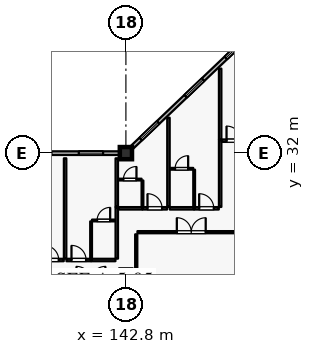
"""IFC4 building model, lengths in metres.
Left out: names, types, materials, properties, quantities, classifications, styles, units other than length and angle.
Written with IfcOpenShell. Run it as: python <this file> out.ifc"""

import sys

from ifc_helpers import new_model, si_unit, direction, frame, frame_2d, origin, origin_2d, place, context, subcontext, project, spatial, rectangle, extrude, element, fill, save


model = new_model("IFC4")
c1 = context("Model", 3, precision=1e-05, world=origin(), true_north=direction((0.0, 1.0)))
c2 = subcontext(c1, "Body", "Model", "MODEL_VIEW")
j1 = project(units=[si_unit("LENGTHUNIT", "METRE"), si_unit("PLANEANGLEUNIT", "RADIAN")], contexts=[c1])
p1 = place(None, origin())
s1 = spatial("IfcSite", under=j1, at=p1, CompositionType="ELEMENT")
p2 = place(p1, origin())
s2 = spatial("IfcBuilding", under=s1, at=p2, CompositionType="ELEMENT")
p3 = place(p2, frame((0.0, 0.0, 25.2)))
s3 = spatial("IfcBuildingStorey", under=s2, at=p3, CompositionType="ELEMENT", Elevation=25.2)
p4 = place(p3, frame((142.8, 32.0, 0.0), z_axis=(0.0, 0.0, 1.0), x_axis=(1.0, 0.0, 0.0)))
e1 = element("IfcColumn", 1, at=p4, inside=s3, PredefinedType="COLUMN", context=c2, shape_type="SweptSolid", body=[
    extrude(rectangle(XDim=0.8, YDim=0.8, at=origin_2d()), origin(), (0.0, 0.0, 1.0), 3.6),
])
p5 = place(p3, frame((142.8, 24.0, 0.0), z_axis=(0.0, 0.0, 1.0), x_axis=(1.0, 0.0, 0.0)))
e2 = element("IfcColumn", 2, at=p5, inside=s3, PredefinedType="COLUMN", context=c2, shape_type="SweptSolid", body=[
    extrude(rectangle(XDim=0.7, YDim=0.7, at=origin_2d()), origin(), (0.0, 0.0, 1.0), 3.6),
])
p6 = place(p3, frame((134.8, 32.0, 0.0), z_axis=(0.0, 0.0, 1.0), x_axis=(1.0, 0.0, 0.0)))
e3 = element("IfcWall", 3, at=p6, inside=s3, PredefinedType="SOLIDWALL", context=c2, shape_type="SweptSolid", body=[
    extrude(rectangle(XDim=7.6, YDim=0.24, at=frame_2d((3.8, 0.0))), origin(), (0.0, 0.0, 1.0), 2.93),
])
p7 = place(p6, frame((1.5, 0.0, 0.8)))
e4 = element("IfcOpeningElement", 4, at=p7, cuts=e3, PredefinedType="OPENING", context=c2, shape_type="SweptSolid", body=[
    extrude(rectangle(XDim=1.6, YDim=1.6, at=frame_2d((0.8, 0.8))), frame((0.0, 0.13, 0.0), z_axis=(0.0, -1.0, 0.0), x_axis=(1.0, 0.0, 0.0)), (0.0, 0.0, 1.0), 0.26),
])
p8 = place(p6, frame((4.9, 0.0, 0.8)))
e5 = element("IfcOpeningElement", 5, at=p8, cuts=e3, PredefinedType="OPENING", context=c2, shape_type="SweptSolid", body=[
    extrude(rectangle(XDim=1.6, YDim=1.6, at=frame_2d((0.8, 0.8))), frame((0.0, 0.13, 0.0), z_axis=(0.0, -1.0, 0.0), x_axis=(1.0, 0.0, 0.0)), (0.0, 0.0, 1.0), 0.26),
])
p9 = place(p3, frame((143.2, 32.381, 0.0), z_axis=(0.0, 0.0, 1.0), x_axis=(0.724156739794, 0.689635422677, 0.0)))
e6 = element("IfcWall", 6, at=p9, inside=s3, PredefinedType="SOLIDWALL", context=c2, shape_type="SweptSolid", body=[
    extrude(rectangle(XDim=10.495, YDim=0.24, at=frame_2d((5.248, 0.0))), origin(), (0.0, 0.0, 1.0), 2.93),
])
p10 = place(p9, frame((0.788, 0.0, 0.8)))
e7 = element("IfcOpeningElement", 7, at=p10, cuts=e6, PredefinedType="OPENING", context=c2, shape_type="SweptSolid", body=[
    extrude(rectangle(XDim=1.6, YDim=1.6, at=frame_2d((0.8, 0.8))), frame((0.0, 0.13, 0.0), z_axis=(0.0, -1.0, 0.0), x_axis=(1.0, 0.0, 0.0)), (0.0, 0.0, 1.0), 0.26),
])
p11 = place(p9, frame((4.862, 0.0, 0.8)))
e8 = element("IfcOpeningElement", 8, at=p11, cuts=e6, PredefinedType="OPENING", context=c2, shape_type="SweptSolid", body=[
    extrude(rectangle(XDim=1.6, YDim=1.6, at=frame_2d((0.8, 0.8))), frame((0.0, 0.13, 0.0), z_axis=(0.0, -1.0, 0.0), x_axis=(1.0, 0.0, 0.0)), (0.0, 0.0, 1.0), 0.26),
])
p12 = place(p9, frame((8.521, 0.0, 0.8)))
e9 = element("IfcOpeningElement", 9, at=p12, cuts=e6, PredefinedType="OPENING", context=c2, shape_type="SweptSolid", body=[
    extrude(rectangle(XDim=1.6, YDim=1.6, at=frame_2d((0.8, 0.8))), frame((0.0, 0.13, 0.0), z_axis=(0.0, -1.0, 0.0), x_axis=(1.0, 0.0, 0.0)), (0.0, 0.0, 1.0), 0.26),
])
p13 = place(p3, frame((137.09, 24.97, 0.0), z_axis=(0.0, 0.0, 1.0), x_axis=(1.0, 0.0, 0.0)))
e10 = element("IfcWall", 10, at=p13, inside=s3, PredefinedType="PARTITIONING", context=c2, shape_type="SweptSolid", body=[
    extrude(rectangle(XDim=1.62, YDim=0.16, at=frame_2d((0.81, 0.0))), origin(), (0.0, 0.0, 1.0), 3.335),
])
p14 = place(p13, frame((0.33, 0.0, 0.0)))
e11 = element("IfcOpeningElement", 11, at=p14, cuts=e10, PredefinedType="OPENING", context=c2, shape_type="SweptSolid", body=[
    extrude(rectangle(XDim=0.96, YDim=2.2, at=frame_2d((0.48, 1.1))), frame((0.0, 0.09, 0.0), z_axis=(0.0, -1.0, 0.0), x_axis=(1.0, 0.0, 0.0)), (0.0, 0.0, 1.0), 0.18),
])
p15 = place(p3, frame((138.89, 24.97, 0.0), z_axis=(0.0, 0.0, 1.0), x_axis=(1.0, 0.0, 0.0)))
e12 = element("IfcWall", 12, at=p15, inside=s3, PredefinedType="PARTITIONING", context=c2, shape_type="SweptSolid", body=[
    extrude(rectangle(XDim=1.62, YDim=0.16, at=frame_2d((0.81, 0.0))), origin(), (0.0, 0.0, 1.0), 3.335),
])
p16 = place(p15, frame((0.33, 0.0, 0.0)))
e13 = element("IfcOpeningElement", 13, at=p16, cuts=e12, PredefinedType="OPENING", context=c2, shape_type="SweptSolid", body=[
    extrude(rectangle(XDim=0.96, YDim=2.2, at=frame_2d((0.48, 1.1))), frame((0.0, 0.09, 0.0), z_axis=(0.0, -1.0, 0.0), x_axis=(1.0, 0.0, 0.0)), (0.0, 0.0, 1.0), 0.18),
])
p17 = place(p3, frame((140.52, 24.97, 0.0), z_axis=(0.0, 0.0, 1.0), x_axis=(1.0, 0.0, 0.0)))
e14 = element("IfcWall", 14, at=p17, inside=s3, PredefinedType="PARTITIONING", context=c2, shape_type="SweptSolid", body=[
    extrude(rectangle(XDim=1.59, YDim=0.16, at=frame_2d((0.795, 0.0))), origin(), (0.0, 0.0, 1.0), 3.335),
])
p18 = place(p3, frame((140.51, 25.06, 0.0), z_axis=(0.0, 0.0, 1.0), x_axis=(0.0, 1.0, 0.0)))
e15 = element("IfcWall", 15, at=p18, inside=s3, PredefinedType="PARTITIONING", context=c2, shape_type="SweptSolid", body=[
    extrude(rectangle(XDim=2.45, YDim=0.115, at=frame_2d((1.225, 0.0))), origin(), (0.0, 0.0, 1.0), 3.335),
])
p19 = place(p3, frame((140.57, 27.57, 0.0), z_axis=(0.0, 0.0, 1.0), x_axis=(1.0, 0.0, 0.0)))
e16 = element("IfcWall", 16, at=p19, inside=s3, PredefinedType="PARTITIONING", context=c2, shape_type="SweptSolid", body=[
    extrude(rectangle(XDim=1.53, YDim=0.115, at=frame_2d((0.765, 0.0))), origin(), (0.0, 0.0, 1.0), 3.335),
])
p20 = place(p19, frame((0.335, 0.0, 0.0)))
e17 = element("IfcOpeningElement", 17, at=p20, cuts=e16, PredefinedType="OPENING", context=c2, shape_type="SweptSolid", body=[
    extrude(rectangle(XDim=0.86, YDim=2.12, at=frame_2d((0.43, 1.06))), frame((0.0, 0.067, 0.0), z_axis=(0.0, -1.0, 0.0), x_axis=(1.0, 0.0, 0.0)), (0.0, 0.0, 1.0), 0.135),
])
p21 = place(p3, frame((138.8, 25.06, 0.0), z_axis=(0.0, 0.0, 1.0), x_axis=(0.0, 1.0, 0.0)))
e18 = element("IfcWall", 18, at=p21, inside=s3, PredefinedType="PARTITIONING", context=c2, shape_type="SweptSolid", body=[
    extrude(rectangle(XDim=6.6, YDim=0.16, at=frame_2d((3.3, 0.0))), origin(), (0.0, 0.0, 1.0), 3.335),
])
p22 = place(p3, frame((142.2, 25.06, 0.0), z_axis=(0.0, 0.0, 1.0), x_axis=(0.0, 1.0, 0.0)))
e19 = element("IfcWall", 19, at=p22, inside=s3, PredefinedType="PARTITIONING", context=c2, shape_type="SweptSolid", body=[
    extrude(rectangle(XDim=3.39, YDim=0.16, at=frame_2d((1.695, 0.0))), origin(), (0.0, 0.0, 1.0), 3.335),
])
p23 = place(p3, frame((142.29, 28.37, 0.0), z_axis=(0.0, 0.0, 1.0), x_axis=(1.0, 0.0, 0.0)))
e20 = element("IfcWall", 20, at=p23, inside=s3, PredefinedType="PARTITIONING", context=c2, shape_type="SweptSolid", body=[
    extrude(rectangle(XDim=1.59, YDim=0.16, at=frame_2d((0.795, 0.0))), origin(), (0.0, 0.0, 1.0), 3.335),
])
p24 = place(p3, frame((143.89, 28.37, 0.0), z_axis=(0.0, 0.0, 1.0), x_axis=(1.0, 0.0, 0.0)))
e21 = element("IfcWall", 21, at=p24, inside=s3, PredefinedType="PARTITIONING", context=c2, shape_type="SweptSolid", body=[
    extrude(rectangle(XDim=1.62, YDim=0.16, at=frame_2d((0.81, 0.0))), origin(), (0.0, 0.0, 1.0), 3.335),
])
p25 = place(p24, frame((0.33, 0.0, 0.0)))
e22 = element("IfcOpeningElement", 22, at=p25, cuts=e21, PredefinedType="OPENING", context=c2, shape_type="SweptSolid", body=[
    extrude(rectangle(XDim=0.96, YDim=2.2, at=frame_2d((0.48, 1.1))), frame((0.0, 0.09, 0.0), z_axis=(0.0, -1.0, 0.0), x_axis=(1.0, 0.0, 0.0)), (0.0, 0.0, 1.0), 0.18),
])
p26 = place(p3, frame((143.89, 28.46, 0.0), z_axis=(0.0, 0.0, 1.0), x_axis=(0.0, 1.0, 0.0)))
e23 = element("IfcWall", 23, at=p26, inside=s3, PredefinedType="PARTITIONING", context=c2, shape_type="SweptSolid", body=[
    extrude(rectangle(XDim=1.74, YDim=0.115, at=frame_2d((0.87, 0.0))), origin(), (0.0, 0.0, 1.0), 3.335),
])
p27 = place(p3, frame((142.3, 30.26, 0.0), z_axis=(0.0, 0.0, 1.0), x_axis=(1.0, 0.0, 0.0)))
e24 = element("IfcWall", 24, at=p27, inside=s3, PredefinedType="PARTITIONING", context=c2, shape_type="SweptSolid", body=[
    extrude(rectangle(XDim=1.53, YDim=0.115, at=frame_2d((0.765, 0.0))), origin(), (0.0, 0.0, 1.0), 3.335),
])
p28 = place(p27, frame((0.335, 0.0, 0.0)))
e25 = element("IfcOpeningElement", 25, at=p28, cuts=e24, PredefinedType="OPENING", context=c2, shape_type="SweptSolid", body=[
    extrude(rectangle(XDim=0.86, YDim=2.12, at=frame_2d((0.43, 1.06))), frame((0.0, 0.067, 0.0), z_axis=(0.0, -1.0, 0.0), x_axis=(1.0, 0.0, 0.0)), (0.0, 0.0, 1.0), 0.135),
])
p29 = place(p3, frame((142.2, 28.46, 0.0), z_axis=(0.0, 0.0, 1.0), x_axis=(0.0, 1.0, 0.0)))
e26 = element("IfcWall", 26, at=p29, inside=s3, PredefinedType="PARTITIONING", context=c2, shape_type="SweptSolid", body=[
    extrude(rectangle(XDim=3.2, YDim=0.16, at=frame_2d((1.6, 0.0))), origin(), (0.0, 0.0, 1.0), 3.335),
])
p30 = place(p3, frame((145.69, 28.37, 0.0), z_axis=(0.0, 0.0, 1.0), x_axis=(1.0, 0.0, 0.0)))
e27 = element("IfcWall", 27, at=p30, inside=s3, PredefinedType="PARTITIONING", context=c2, shape_type="SweptSolid", body=[
    extrude(rectangle(XDim=1.59, YDim=0.16, at=frame_2d((0.795, 0.0))), origin(), (0.0, 0.0, 1.0), 3.335),
])
p31 = place(p3, frame((147.29, 28.37, 0.0), z_axis=(0.0, 0.0, 1.0), x_axis=(1.0, 0.0, 0.0)))
e28 = element("IfcWall", 28, at=p31, inside=s3, PredefinedType="PARTITIONING", context=c2, shape_type="SweptSolid", body=[
    extrude(rectangle(XDim=1.62, YDim=0.16, at=frame_2d((0.81, 0.0))), origin(), (0.0, 0.0, 1.0), 3.335),
])
p32 = place(p31, frame((0.33, 0.0, 0.0)))
e29 = element("IfcOpeningElement", 29, at=p32, cuts=e28, PredefinedType="OPENING", context=c2, shape_type="SweptSolid", body=[
    extrude(rectangle(XDim=0.96, YDim=2.2, at=frame_2d((0.48, 1.1))), frame((0.0, 0.09, 0.0), z_axis=(0.0, -1.0, 0.0), x_axis=(1.0, 0.0, 0.0)), (0.0, 0.0, 1.0), 0.18),
])
p33 = place(p3, frame((147.29, 28.46, 0.0), z_axis=(0.0, 0.0, 1.0), x_axis=(0.0, 1.0, 0.0)))
e30 = element("IfcWall", 30, at=p33, inside=s3, PredefinedType="PARTITIONING", context=c2, shape_type="SweptSolid", body=[
    extrude(rectangle(XDim=2.45, YDim=0.115, at=frame_2d((1.225, 0.0))), origin(), (0.0, 0.0, 1.0), 3.335),
])
p34 = place(p3, frame((145.7, 30.97, 0.0), z_axis=(0.0, 0.0, 1.0), x_axis=(1.0, 0.0, 0.0)))
e31 = element("IfcWall", 31, at=p34, inside=s3, PredefinedType="PARTITIONING", context=c2, shape_type="SweptSolid", body=[
    extrude(rectangle(XDim=1.53, YDim=0.115, at=frame_2d((0.765, 0.0))), origin(), (0.0, 0.0, 1.0), 3.335),
])
p35 = place(p34, frame((0.335, 0.0, 0.0)))
e32 = element("IfcOpeningElement", 32, at=p35, cuts=e31, PredefinedType="OPENING", context=c2, shape_type="SweptSolid", body=[
    extrude(rectangle(XDim=0.86, YDim=2.12, at=frame_2d((0.43, 1.06))), frame((0.0, 0.067, 0.0), z_axis=(0.0, -1.0, 0.0), x_axis=(1.0, 0.0, 0.0)), (0.0, 0.0, 1.0), 0.135),
])
p36 = place(p3, frame((145.6, 28.46, 0.0), z_axis=(0.0, 0.0, 1.0), x_axis=(0.0, 1.0, 0.0)))
e33 = element("IfcWall", 33, at=p36, inside=s3, PredefinedType="PARTITIONING", context=c2, shape_type="SweptSolid", body=[
    extrude(rectangle(XDim=5.87, YDim=0.16, at=frame_2d((2.935, 0.0))), origin(), (0.0, 0.0, 1.0), 3.335),
])
p37 = place(p3, frame((149.0, 28.46, 0.0), z_axis=(0.0, 0.0, 1.0), x_axis=(0.0, 1.0, 0.0)))
e34 = element("IfcWall", 34, at=p37, inside=s3, PredefinedType="PARTITIONING", context=c2, shape_type="SweptSolid", body=[
    extrude(rectangle(XDim=4.44, YDim=0.16, at=frame_2d((2.22, 0.0))), origin(), (0.0, 0.0, 1.0), 3.335),
])
p38 = place(p3, frame((149.09, 32.82, 0.0), z_axis=(0.0, 0.0, 1.0), x_axis=(1.0, 0.0, 0.0)))
e35 = element("IfcWall", 35, at=p38, inside=s3, PredefinedType="PARTITIONING", context=c2, shape_type="SweptSolid", body=[
    extrude(rectangle(XDim=1.62, YDim=0.16, at=frame_2d((0.81, 0.0))), origin(), (0.0, 0.0, 1.0), 3.335),
])
p39 = place(p38, frame((0.33, 0.0, 0.0)))
e36 = element("IfcOpeningElement", 36, at=p39, cuts=e35, PredefinedType="OPENING", context=c2, shape_type="SweptSolid", body=[
    extrude(rectangle(XDim=0.96, YDim=2.2, at=frame_2d((0.48, 1.1))), frame((0.0, 0.09, 0.0), z_axis=(0.0, -1.0, 0.0), x_axis=(1.0, 0.0, 0.0)), (0.0, 0.0, 1.0), 0.18),
])
p40 = place(p3, frame((149.0, 32.91, 0.0), z_axis=(0.0, 0.0, 1.0), x_axis=(0.0, 1.0, 0.0)))
e37 = element("IfcWall", 37, at=p40, inside=s3, PredefinedType="PARTITIONING", context=c2, shape_type="SweptSolid", body=[
    extrude(rectangle(XDim=4.65, YDim=0.16, at=frame_2d((2.325, 0.0))), origin(), (0.0, 0.0, 1.0), 3.335),
])
p41 = place(p3, frame((143.56, 26.8, 0.0), z_axis=(0.0, 0.0, 1.0), x_axis=(1.0, 0.0, 0.0)))
e38 = element("IfcWall", 38, at=p41, inside=s3, PredefinedType="PARTITIONING", context=c2, shape_type="SweptSolid", body=[
    extrude(rectangle(XDim=7.08, YDim=0.14, at=frame_2d((3.54, 0.0))), origin(), (0.0, 0.0, 1.0), 3.335),
])
p42 = place(p41, frame((2.59, 0.0, 0.0)))
e39 = element("IfcOpeningElement", 39, at=p42, cuts=e38, PredefinedType="OPENING", context=c2, shape_type="SweptSolid", body=[
    extrude(rectangle(XDim=1.9, YDim=2.4, at=frame_2d((0.95, 1.2))), frame((0.0, 0.08, 0.0), z_axis=(0.0, -1.0, 0.0), x_axis=(1.0, 0.0, 0.0)), (0.0, 0.0, 1.0), 0.16),
])
p43 = place(p3, frame((143.48, 23.45, 0.0), z_axis=(0.0, 0.0, 1.0), x_axis=(0.0, 1.0, 0.0)))
e40 = element("IfcWall", 40, at=p43, inside=s3, PredefinedType="PARTITIONING", context=c2, shape_type="SweptSolid", body=[
    extrude(rectangle(XDim=3.21, YDim=0.14, at=frame_2d((1.605, 0.0))), origin(), (0.0, 0.0, 1.0), 3.335),
])
p44 = place(p8, origin())
e41 = element("IfcWindow", 41, at=p44, inside=s3, PartitioningType="SINGLE_PANEL", PredefinedType="WINDOW", context=c2, shape_type="SweptSolid", body=[
    extrude(rectangle(XDim=1.6, YDim=1.6, at=frame_2d((0.8, 0.8))), frame((0.0, 0.03, 0.0), z_axis=(0.0, -1.0, 0.0), x_axis=(1.0, 0.0, 0.0)), (0.0, 0.0, 1.0), 0.06),
])
fill(e5, e41)
p45 = place(p10, origin())
e42 = element("IfcWindow", 42, at=p45, inside=s3, PartitioningType="SINGLE_PANEL", PredefinedType="WINDOW", context=c2, shape_type="SweptSolid", body=[
    extrude(rectangle(XDim=1.6, YDim=1.6, at=frame_2d((0.8, 0.8))), frame((0.0, 0.03, 0.0), z_axis=(0.0, -1.0, 0.0), x_axis=(1.0, 0.0, 0.0)), (0.0, 0.0, 1.0), 0.06),
])
fill(e7, e42)
p46 = place(p11, origin())
e43 = element("IfcWindow", 43, at=p46, inside=s3, PartitioningType="SINGLE_PANEL", PredefinedType="WINDOW", context=c2, shape_type="SweptSolid", body=[
    extrude(rectangle(XDim=1.6, YDim=1.6, at=frame_2d((0.8, 0.8))), frame((0.0, 0.03, 0.0), z_axis=(0.0, -1.0, 0.0), x_axis=(1.0, 0.0, 0.0)), (0.0, 0.0, 1.0), 0.06),
])
fill(e8, e43)
p47 = place(p12, origin())
e44 = element("IfcWindow", 44, at=p47, inside=s3, PartitioningType="SINGLE_PANEL", PredefinedType="WINDOW", context=c2, shape_type="SweptSolid", body=[
    extrude(rectangle(XDim=1.6, YDim=1.6, at=frame_2d((0.8, 0.8))), frame((0.0, 0.03, 0.0), z_axis=(0.0, -1.0, 0.0), x_axis=(1.0, 0.0, 0.0)), (0.0, 0.0, 1.0), 0.06),
])
fill(e9, e44)
p48 = place(p14, origin())
e45 = element("IfcDoor", 45, at=p48, inside=s3, OperationType="SINGLE_SWING_LEFT", PredefinedType="DOOR", context=c2, shape_type="SweptSolid", body=[
    extrude(rectangle(XDim=0.96, YDim=2.2, at=frame_2d((0.48, 1.1))), frame((0.0, 0.025, 0.0), z_axis=(0.0, -1.0, 0.0), x_axis=(1.0, 0.0, 0.0)), (0.0, 0.0, 1.0), 0.05),
])
fill(e11, e45)
p49 = place(p16, origin())
e46 = element("IfcDoor", 46, at=p49, inside=s3, OperationType="SINGLE_SWING_LEFT", PredefinedType="DOOR", context=c2, shape_type="SweptSolid", body=[
    extrude(rectangle(XDim=0.96, YDim=2.2, at=frame_2d((0.48, 1.1))), frame((0.0, 0.025, 0.0), z_axis=(0.0, -1.0, 0.0), x_axis=(1.0, 0.0, 0.0)), (0.0, 0.0, 1.0), 0.05),
])
fill(e13, e46)
p50 = place(p20, origin())
e47 = element("IfcDoor", 47, at=p50, inside=s3, OperationType="SINGLE_SWING_RIGHT", PredefinedType="DOOR", context=c2, shape_type="SweptSolid", body=[
    extrude(rectangle(XDim=0.86, YDim=2.12, at=frame_2d((0.43, 1.06))), frame((0.0, 0.025, 0.0), z_axis=(0.0, -1.0, 0.0), x_axis=(1.0, 0.0, 0.0)), (0.0, 0.0, 1.0), 0.05),
])
fill(e17, e47)
p51 = place(p25, origin())
e48 = element("IfcDoor", 48, at=p51, inside=s3, OperationType="SINGLE_SWING_LEFT", PredefinedType="DOOR", context=c2, shape_type="SweptSolid", body=[
    extrude(rectangle(XDim=0.96, YDim=2.2, at=frame_2d((0.48, 1.1))), frame((0.0, 0.025, 0.0), z_axis=(0.0, -1.0, 0.0), x_axis=(1.0, 0.0, 0.0)), (0.0, 0.0, 1.0), 0.05),
])
fill(e22, e48)
p52 = place(p28, origin())
e49 = element("IfcDoor", 49, at=p52, inside=s3, OperationType="SINGLE_SWING_RIGHT", PredefinedType="DOOR", context=c2, shape_type="SweptSolid", body=[
    extrude(rectangle(XDim=0.86, YDim=2.12, at=frame_2d((0.43, 1.06))), frame((0.0, 0.025, 0.0), z_axis=(0.0, -1.0, 0.0), x_axis=(1.0, 0.0, 0.0)), (0.0, 0.0, 1.0), 0.05),
])
fill(e25, e49)
p53 = place(p32, origin())
e50 = element("IfcDoor", 50, at=p53, inside=s3, OperationType="SINGLE_SWING_LEFT", PredefinedType="DOOR", context=c2, shape_type="SweptSolid", body=[
    extrude(rectangle(XDim=0.96, YDim=2.2, at=frame_2d((0.48, 1.1))), frame((0.0, 0.025, 0.0), z_axis=(0.0, -1.0, 0.0), x_axis=(1.0, 0.0, 0.0)), (0.0, 0.0, 1.0), 0.05),
])
fill(e29, e50)
p54 = place(p35, origin())
e51 = element("IfcDoor", 51, at=p54, inside=s3, OperationType="SINGLE_SWING_RIGHT", PredefinedType="DOOR", context=c2, shape_type="SweptSolid", body=[
    extrude(rectangle(XDim=0.86, YDim=2.12, at=frame_2d((0.43, 1.06))), frame((0.0, 0.025, 0.0), z_axis=(0.0, -1.0, 0.0), x_axis=(1.0, 0.0, 0.0)), (0.0, 0.0, 1.0), 0.05),
])
fill(e32, e51)
p55 = place(p39, origin())
e52 = element("IfcDoor", 52, at=p55, inside=s3, OperationType="SINGLE_SWING_LEFT", PredefinedType="DOOR", context=c2, shape_type="SweptSolid", body=[
    extrude(rectangle(XDim=0.96, YDim=2.2, at=frame_2d((0.48, 1.1))), frame((0.0, 0.025, 0.0), z_axis=(0.0, -1.0, 0.0), x_axis=(1.0, 0.0, 0.0)), (0.0, 0.0, 1.0), 0.05),
])
fill(e36, e52)
p56 = place(p42, origin())
e53 = element("IfcDoor", 53, at=p56, inside=s3, OperationType="DOUBLE_DOOR_SINGLE_SWING", PredefinedType="DOOR", context=c2, shape_type="SweptSolid", body=[
    extrude(rectangle(XDim=1.9, YDim=2.4, at=frame_2d((0.95, 1.2))), frame((0.0, 0.025, 0.0), z_axis=(0.0, -1.0, 0.0), x_axis=(1.0, 0.0, 0.0)), (0.0, 0.0, 1.0), 0.05),
])
fill(e39, e53)
save(model, sys.argv[1])
